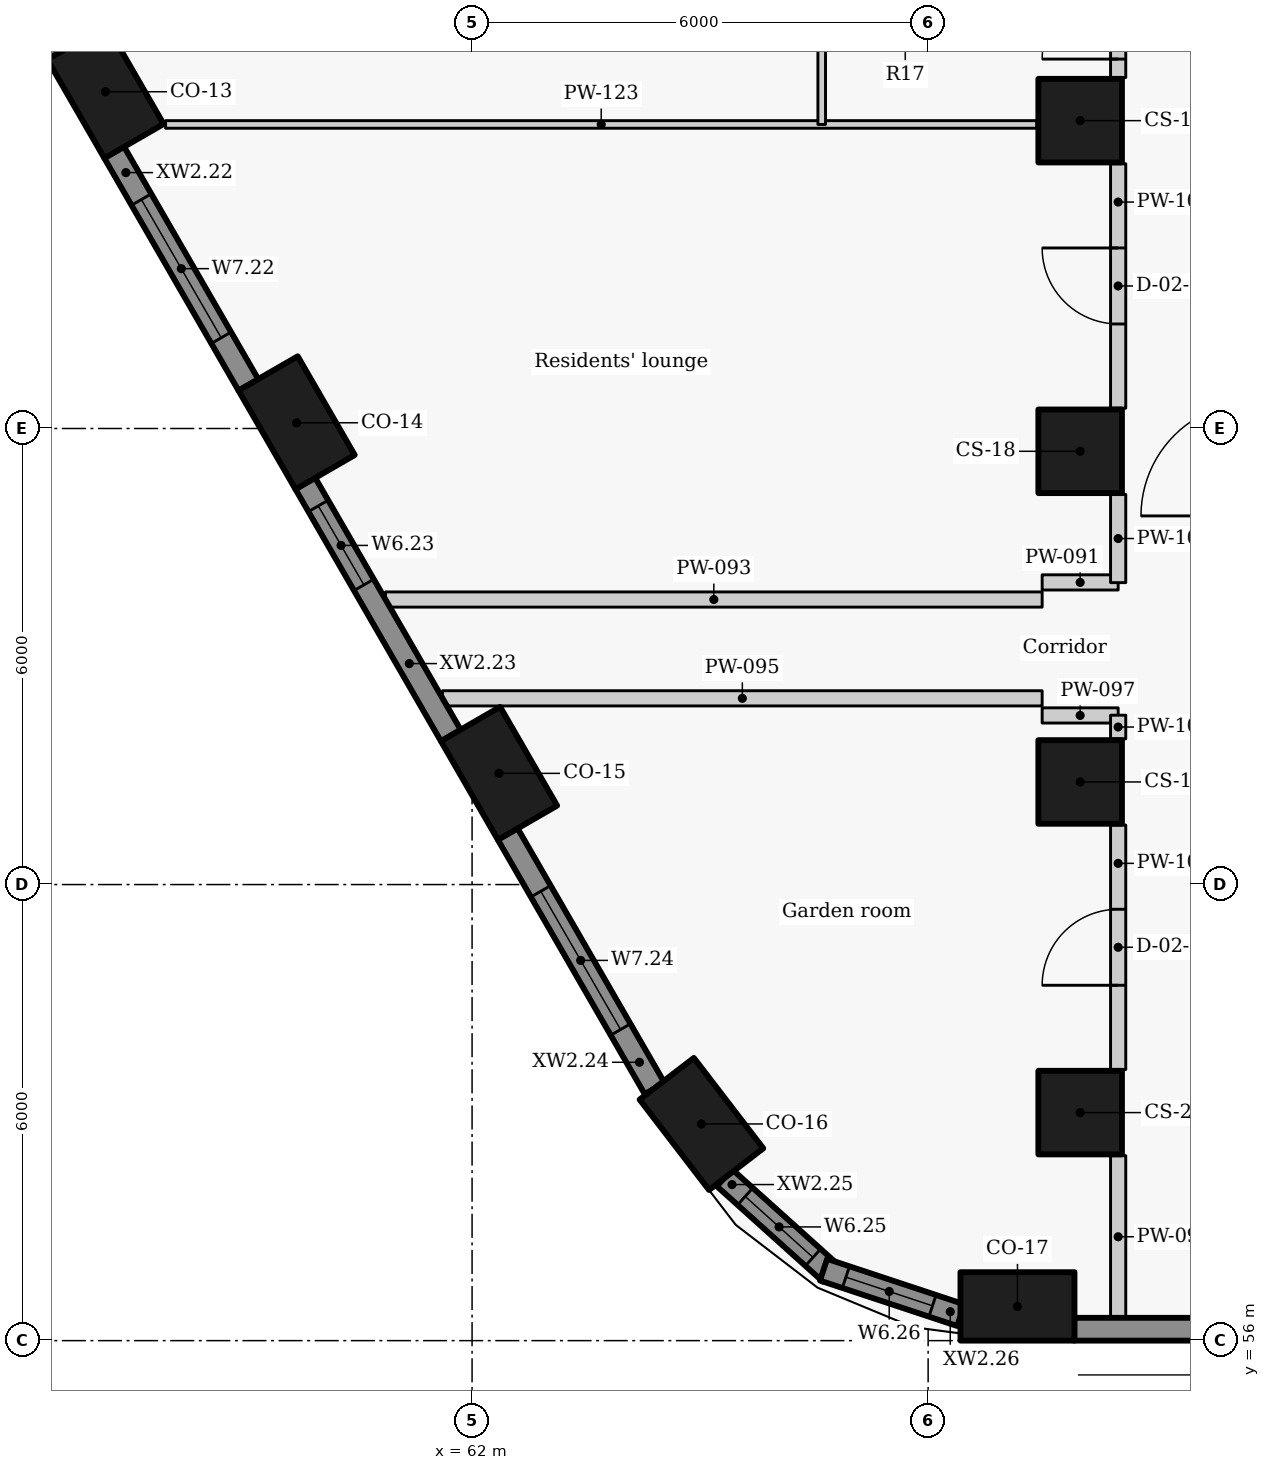
"""IFC4 building model, lengths in metres.
Left out: names, types, materials, properties, quantities, classifications, styles, units other than length and angle.
Written with IfcOpenShell. Run it as: python <this file> out.ifc"""

import sys

from ifc_helpers import new_model, si_unit, direction, frame, frame_2d, origin, origin_2d, place, context, subcontext, project, spatial, rectangle, extrude, element, fill, save


model = new_model("IFC4")
c1 = context("Model", 3, precision=1e-05, world=origin(), true_north=direction((0.0, 1.0)))
c2 = subcontext(c1, "Body", "Model", "MODEL_VIEW")
j1 = project(units=[si_unit("LENGTHUNIT", "METRE"), si_unit("PLANEANGLEUNIT", "RADIAN")], contexts=[c1])
p1 = place(None, origin())
s1 = spatial("IfcSite", under=j1, at=p1, CompositionType="ELEMENT")
p2 = place(p1, origin())
s2 = spatial("IfcBuilding", under=s1, at=p2, CompositionType="ELEMENT")
p3 = place(p2, frame((0.0, 0.0, 51.3)))
s3 = spatial("IfcBuildingStorey", under=s2, at=p3, CompositionType="ELEMENT", Elevation=51.3)
for number, where, z_axis, x_axis in (
    (1, (57.177, 72.43, 0.0), (0.0, 0.0, 1.0), (0.5, -0.866, 0.0)),
    (2, (59.692, 68.075, 0.0), (0.0, 0.0, 1.0), (0.5, -0.866, 0.0)),
    (3, (62.354, 63.463, 0.0), (0.0, 0.0, 1.0), (0.5, -0.866, 0.0)),
    (4, (65.018, 58.851, 0.0), (0.0, 0.0, 1.0), (0.609, -0.793, 0.0)),
    (5, (69.175, 56.45, 0.0), (0.0, 0.0, 1.0), (1.0, 0.0, 0.0)),
):
    element("IfcColumn", number, at=place(p3, frame(where, z_axis=z_axis, x_axis=x_axis)), inside=s3, PredefinedType="COLUMN", context=c2, shape_type="SweptSolid", body=[
        extrude(rectangle(XDim=1.5, YDim=0.9, at=origin_2d()), origin(), (0.0, 0.0, 1.0), 3.3),
    ])
for number, where, z_axis, x_axis in (
    (6, (70.0, 72.05, 0.0), (0.0, 0.0, 1.0), (0.0, -1.0, 0.0)),
    (7, (70.0, 67.7, 0.0), (0.0, 0.0, 1.0), (0.0, -1.0, 0.0)),
    (8, (70.0, 63.35, 0.0), (0.0, 0.0, 1.0), (0.0, -1.0, 0.0)),
    (9, (70.0, 59.0, 0.0), (0.0, 0.0, 1.0), (0.0, -1.0, 0.0)),
):
    element("IfcColumn", number, at=place(p3, frame(where, z_axis=z_axis, x_axis=x_axis)), inside=s3, PredefinedType="COLUMN", context=c2, shape_type="SweptSolid", body=[
        extrude(rectangle(XDim=1.1, YDim=1.1, at=origin_2d()), origin(), (0.0, 0.0, 1.0), 3.3),
    ])
p4 = place(p3, frame((53.814, 77.847, 0.0), z_axis=(0.0, 0.0, 1.0), x_axis=(0.492363204642, -0.870389840655, 0.0)))
e10 = element("IfcWall", 10, at=p4, inside=s3, PredefinedType="SOLIDWALL", context=c2, shape_type="SweptSolid", body=[
    extrude(rectangle(XDim=5.626, YDim=0.3, at=frame_2d((2.813, 0.0))), origin(), (0.0, 0.0, 1.0), 2.425),
])
p5 = place(p4, frame((0.965, 0.0, 0.9)))
e11 = element("IfcOpeningElement", 11, at=p5, cuts=e10, PredefinedType="OPENING", context=c2, shape_type="SweptSolid", body=[
    extrude(rectangle(XDim=2.1, YDim=1.1, at=frame_2d((1.05, 0.55))), frame((0.0, 0.16, 0.0), z_axis=(0.0, -1.0, 0.0), x_axis=(1.0, 0.0, 0.0)), (0.0, 0.0, 1.0), 0.32),
])
p6 = place(p4, frame((3.789, 0.0, 0.9)))
e12 = element("IfcOpeningElement", 12, at=p6, cuts=e10, PredefinedType="OPENING", context=c2, shape_type="SweptSolid", body=[
    extrude(rectangle(XDim=1.5, YDim=1.1, at=frame_2d((0.75, 0.55))), frame((0.0, 0.16, 0.0), z_axis=(0.0, -1.0, 0.0), x_axis=(1.0, 0.0, 0.0)), (0.0, 0.0, 1.0), 0.32),
])
p7 = place(p3, frame((57.29, 71.634, 0.0), z_axis=(0.0, 0.0, 1.0), x_axis=(0.499977402622, -0.866038449993, 0.0)))
e13 = element("IfcWall", 13, at=p7, inside=s3, PredefinedType="SOLIDWALL", context=c2, shape_type="SweptSolid", body=[
    extrude(rectangle(XDim=3.537, YDim=0.3, at=frame_2d((1.769, 0.0))), origin(), (0.0, 0.0, 1.0), 2.425),
])
p8 = place(p7, frame((0.719, 0.0, 0.9)))
e14 = element("IfcOpeningElement", 14, at=p8, cuts=e13, PredefinedType="OPENING", context=c2, shape_type="SweptSolid", body=[
    extrude(rectangle(XDim=2.1, YDim=1.1, at=frame_2d((1.05, 0.55))), frame((0.0, 0.16, 0.0), z_axis=(0.0, -1.0, 0.0), x_axis=(1.0, 0.0, 0.0)), (0.0, 0.0, 1.0), 0.32),
])
p9 = place(p3, frame((59.805, 67.279, 0.0), z_axis=(0.0, 0.0, 1.0), x_axis=(0.500001735503, -0.866024401789, 0.0)))
e15 = element("IfcWall", 15, at=p9, inside=s3, PredefinedType="SOLIDWALL", context=c2, shape_type="SweptSolid", body=[
    extrude(rectangle(XDim=3.834, YDim=0.3, at=frame_2d((1.917, 0.0))), origin(), (0.0, 0.0, 1.0), 2.425),
])
p10 = place(p9, frame((0.344, 0.0, 0.9)))
e16 = element("IfcOpeningElement", 16, at=p10, cuts=e15, PredefinedType="OPENING", context=c2, shape_type="SweptSolid", body=[
    extrude(rectangle(XDim=1.2, YDim=1.1, at=frame_2d((0.6, 0.55))), frame((0.0, 0.16, 0.0), z_axis=(0.0, -1.0, 0.0), x_axis=(1.0, 0.0, 0.0)), (0.0, 0.0, 1.0), 0.32),
])
p11 = place(p3, frame((62.468, 62.667, 0.0), z_axis=(0.0, 0.0, 1.0), x_axis=(0.499948341072, -0.866055227026, 0.0)))
e17 = element("IfcWall", 17, at=p11, inside=s3, PredefinedType="SOLIDWALL", context=c2, shape_type="SweptSolid", body=[
    extrude(rectangle(XDim=3.867, YDim=0.3, at=frame_2d((1.934, 0.0))), origin(), (0.0, 0.0, 1.0), 2.425),
])
p12 = place(p11, frame((0.872, 0.0, 0.9)))
e18 = element("IfcOpeningElement", 18, at=p12, cuts=e17, PredefinedType="OPENING", context=c2, shape_type="SweptSolid", body=[
    extrude(rectangle(XDim=2.1, YDim=1.1, at=frame_2d((1.05, 0.55))), frame((0.0, 0.16, 0.0), z_axis=(0.0, -1.0, 0.0), x_axis=(1.0, 0.0, 0.0)), (0.0, 0.0, 1.0), 0.32),
])
p13 = place(p3, frame((65.32, 58.143, 0.0), z_axis=(0.0, 0.0, 1.0), x_axis=(0.7435526378, -0.668677407141, 0.0)))
e19 = element("IfcWall", 19, at=p13, inside=s3, PredefinedType="SOLIDWALL", context=c2, shape_type="SweptSolid", body=[
    extrude(rectangle(XDim=1.878, YDim=0.3, at=frame_2d((0.939, 0.0))), origin(), (0.0, 0.0, 1.0), 2.425),
])
p14 = place(p13, frame((0.367, 0.0, 0.9)))
e20 = element("IfcOpeningElement", 20, at=p14, cuts=e19, PredefinedType="OPENING", context=c2, shape_type="SweptSolid", body=[
    extrude(rectangle(XDim=1.2, YDim=1.1, at=frame_2d((0.6, 0.55))), frame((0.0, 0.16, 0.0), z_axis=(0.0, -1.0, 0.0), x_axis=(1.0, 0.0, 0.0)), (0.0, 0.0, 1.0), 0.32),
])
p15 = place(p3, frame((66.624, 56.933, 0.0), z_axis=(0.0, 0.0, 1.0), x_axis=(0.949246659442, -0.314532636683, 0.0)))
e21 = element("IfcWall", 21, at=p15, inside=s3, PredefinedType="SOLIDWALL", context=c2, shape_type="SweptSolid", body=[
    extrude(rectangle(XDim=1.902, YDim=0.3, at=frame_2d((0.951, 0.0))), origin(), (0.0, 0.0, 1.0), 2.425),
])
p16 = place(p15, frame((0.31, 0.0, 0.9)))
e22 = element("IfcOpeningElement", 22, at=p16, cuts=e21, PredefinedType="OPENING", context=c2, shape_type="SweptSolid", body=[
    extrude(rectangle(XDim=1.2, YDim=1.1, at=frame_2d((0.6, 0.55))), frame((0.0, 0.16, 0.0), z_axis=(0.0, -1.0, 0.0), x_axis=(1.0, 0.0, 0.0)), (0.0, 0.0, 1.0), 0.32),
])
p17 = place(p3, frame((69.921, 56.15, 0.0), z_axis=(0.0, 0.0, 1.0), x_axis=(1.0, 0.0, 0.0)))
e23 = element("IfcWall", 23, at=p17, inside=s3, PredefinedType="SOLIDWALL", context=c2, shape_type="SweptSolid", body=[
    extrude(rectangle(XDim=19.84, YDim=0.3, at=frame_2d((9.92, 0.0))), origin(), (0.0, 0.0, 1.0), 2.425),
])
p18 = place(p3, frame((69.5, 65.975, 0.0), z_axis=(0.0, 0.0, 1.0), x_axis=(1.0, 0.0, 0.0)))
e24 = element("IfcWall", 24, at=p18, inside=s3, PredefinedType="PARTITIONING", context=c2, shape_type="SweptSolid", body=[
    extrude(rectangle(XDim=1.0, YDim=0.2, at=frame_2d((0.5, 0.0))), origin(), (0.0, 0.0, 1.0), 2.505),
])
p19 = place(p3, frame((60.861, 65.75, 0.0), z_axis=(0.0, 0.0, 1.0), x_axis=(1.0, 0.0, 0.0)))
e25 = element("IfcWall", 25, at=p19, inside=s3, PredefinedType="PARTITIONING", context=c2, shape_type="SweptSolid", body=[
    extrude(rectangle(XDim=8.639, YDim=0.2, at=frame_2d((4.32, 0.0))), origin(), (0.0, 0.0, 1.0), 2.405),
])
p20 = place(p3, frame((61.611, 64.45, 0.0), z_axis=(0.0, 0.0, 1.0), x_axis=(1.0, 0.0, 0.0)))
e26 = element("IfcWall", 26, at=p20, inside=s3, PredefinedType="PARTITIONING", context=c2, shape_type="SweptSolid", body=[
    extrude(rectangle(XDim=7.889, YDim=0.2, at=frame_2d((3.944, 0.0))), origin(), (0.0, 0.0, 1.0), 2.405),
])
p21 = place(p3, frame((69.5, 64.225, 0.0), z_axis=(0.0, 0.0, 1.0), x_axis=(1.0, 0.0, 0.0)))
e27 = element("IfcWall", 27, at=p21, inside=s3, PredefinedType="PARTITIONING", context=c2, shape_type="SweptSolid", body=[
    extrude(rectangle(XDim=1.0, YDim=0.2, at=frame_2d((0.5, 0.0))), origin(), (0.0, 0.0, 1.0), 2.505),
])
p22 = place(p3, frame((70.5, 56.3, 0.0), z_axis=(0.0, 0.0, 1.0), x_axis=(0.0, 1.0, 0.0)))
e28 = element("IfcWall", 28, at=p22, inside=s3, PredefinedType="PARTITIONING", context=c2, shape_type="SweptSolid", body=[
    extrude(rectangle(XDim=2.133, YDim=0.2, at=frame_2d((1.066, 0.0))), origin(), (0.0, 0.0, 1.0), 3.025),
])
p23 = place(p3, frame((70.5, 59.567, 0.0), z_axis=(0.0, 0.0, 1.0), x_axis=(0.0, 1.0, 0.0)))
e29 = element("IfcWall", 29, at=p23, inside=s3, PredefinedType="PARTITIONING", context=c2, shape_type="SweptSolid", body=[
    extrude(rectangle(XDim=3.216, YDim=0.2, at=frame_2d((1.608, 0.0))), origin(), (0.0, 0.0, 1.0), 3.025),
])
p24 = place(p23, frame((1.108, 0.0, 0.0)))
e30 = element("IfcOpeningElement", 30, at=p24, cuts=e29, PredefinedType="OPENING", context=c2, shape_type="SweptSolid", body=[
    extrude(rectangle(XDim=1.0, YDim=2.1, at=frame_2d((0.5, 1.05))), frame((0.0, 0.11, 0.0), z_axis=(0.0, -1.0, 0.0), x_axis=(1.0, 0.0, 0.0)), (0.0, 0.0, 1.0), 0.22),
])
p25 = place(p3, frame((70.5, 63.917, 0.0), z_axis=(0.0, 0.0, 1.0), x_axis=(0.0, 1.0, 0.0)))
e31 = element("IfcWall", 31, at=p25, inside=s3, PredefinedType="PARTITIONING", context=c2, shape_type="SweptSolid", body=[
    extrude(rectangle(XDim=0.311, YDim=0.2, at=frame_2d((0.156, 0.0))), origin(), (0.0, 0.0, 1.0), 3.025),
])
p26 = place(p3, frame((70.5, 65.972, 0.0), z_axis=(0.0, 0.0, 1.0), x_axis=(0.0, 1.0, 0.0)))
e32 = element("IfcWall", 32, at=p26, inside=s3, PredefinedType="PARTITIONING", context=c2, shape_type="SweptSolid", body=[
    extrude(rectangle(XDim=1.161, YDim=0.2, at=frame_2d((0.581, 0.0))), origin(), (0.0, 0.0, 1.0), 3.025),
])
p27 = place(p3, frame((70.5, 68.267, 0.0), z_axis=(0.0, 0.0, 1.0), x_axis=(0.0, 1.0, 0.0)))
e33 = element("IfcWall", 33, at=p27, inside=s3, PredefinedType="PARTITIONING", context=c2, shape_type="SweptSolid", body=[
    extrude(rectangle(XDim=3.216, YDim=0.2, at=frame_2d((1.608, 0.0))), origin(), (0.0, 0.0, 1.0), 3.025),
])
p28 = place(p27, frame((1.108, 0.0, 0.0)))
e34 = element("IfcOpeningElement", 34, at=p28, cuts=e33, PredefinedType="OPENING", context=c2, shape_type="SweptSolid", body=[
    extrude(rectangle(XDim=1.0, YDim=2.1, at=frame_2d((0.5, 1.05))), frame((0.0, 0.11, 0.0), z_axis=(0.0, -1.0, 0.0), x_axis=(1.0, 0.0, 0.0)), (0.0, 0.0, 1.0), 0.22),
])
p29 = place(p3, frame((70.5, 72.617, 0.0), z_axis=(0.0, 0.0, 1.0), x_axis=(0.0, 1.0, 0.0)))
e35 = element("IfcWall", 35, at=p29, inside=s3, PredefinedType="PARTITIONING", context=c2, shape_type="SweptSolid", body=[
    extrude(rectangle(XDim=4.166, YDim=0.2, at=frame_2d((2.083, 0.0))), origin(), (0.0, 0.0, 1.0), 3.025),
])
p30 = place(p29, frame((0.243, 0.0, 0.0)))
e36 = element("IfcOpeningElement", 36, at=p30, cuts=e35, PredefinedType="OPENING", context=c2, shape_type="SweptSolid", body=[
    extrude(rectangle(XDim=1.0, YDim=2.1, at=frame_2d((0.5, 1.05))), frame((0.0, 0.11, 0.0), z_axis=(0.0, -1.0, 0.0), x_axis=(1.0, 0.0, 0.0)), (0.0, 0.0, 1.0), 0.22),
])
p31 = place(p3, frame((57.968, 72.0, 0.0), z_axis=(0.0, 0.0, 1.0), x_axis=(1.0, 0.0, 0.0)))
e37 = element("IfcWall", 37, at=p31, inside=s3, PredefinedType="PARTITIONING", context=c2, shape_type="SweptSolid", body=[
    extrude(rectangle(XDim=11.462, YDim=0.1, at=frame_2d((5.731, 0.0))), origin(), (0.0, 0.0, 1.0), 3.025),
])
p32 = place(p3, frame((66.6, 72.0, 0.0), z_axis=(0.0, 0.0, 1.0), x_axis=(0.0, 1.0, 0.0)))
e38 = element("IfcWall", 38, at=p32, inside=s3, PredefinedType="PARTITIONING", context=c2, shape_type="SweptSolid", body=[
    extrude(rectangle(XDim=18.0, YDim=0.1, at=frame_2d((9.0, 0.0))), origin(), (0.0, 0.0, 1.0), 3.025),
])
p33 = place(p32, frame((1.002, 0.0, 0.0)))
e39 = element("IfcOpeningElement", 39, at=p33, cuts=e38, PredefinedType="OPENING", context=c2, shape_type="SweptSolid", body=[
    extrude(rectangle(XDim=0.9, YDim=2.1, at=frame_2d((0.45, 1.05))), frame((0.0, 0.06, 0.0), z_axis=(0.0, -1.0, 0.0), x_axis=(1.0, 0.0, 0.0)), (0.0, 0.0, 1.0), 0.12),
])
p34 = place(p32, frame((4.55, 0.0, 0.0)))
e40 = element("IfcOpeningElement", 40, at=p34, cuts=e38, PredefinedType="OPENING", context=c2, shape_type="SweptSolid", body=[
    extrude(rectangle(XDim=0.9, YDim=2.1, at=frame_2d((0.45, 1.05))), frame((0.0, 0.06, 0.0), z_axis=(0.0, -1.0, 0.0), x_axis=(1.0, 0.0, 0.0)), (0.0, 0.0, 1.0), 0.12),
])
p35 = place(p32, frame((8.098, 0.0, 0.0)))
e41 = element("IfcOpeningElement", 41, at=p35, cuts=e38, PredefinedType="OPENING", context=c2, shape_type="SweptSolid", body=[
    extrude(rectangle(XDim=0.9, YDim=2.1, at=frame_2d((0.45, 1.05))), frame((0.0, 0.06, 0.0), z_axis=(0.0, -1.0, 0.0), x_axis=(1.0, 0.0, 0.0)), (0.0, 0.0, 1.0), 0.12),
])
p36 = place(p32, frame((13.55, 0.0, 0.0)))
e42 = element("IfcOpeningElement", 42, at=p36, cuts=e38, PredefinedType="OPENING", context=c2, shape_type="SweptSolid", body=[
    extrude(rectangle(XDim=0.9, YDim=2.1, at=frame_2d((0.45, 1.05))), frame((0.0, 0.06, 0.0), z_axis=(0.0, -1.0, 0.0), x_axis=(1.0, 0.0, 0.0)), (0.0, 0.0, 1.0), 0.12),
])
p37 = place(p8, origin())
e43 = element("IfcWindow", 43, at=p37, inside=s3, PartitioningType="SINGLE_PANEL", PredefinedType="WINDOW", context=c2, shape_type="SweptSolid", body=[
    extrude(rectangle(XDim=2.1, YDim=1.1, at=frame_2d((1.05, 0.55))), frame((0.0, 0.03, 0.0), z_axis=(0.0, -1.0, 0.0), x_axis=(1.0, 0.0, 0.0)), (0.0, 0.0, 1.0), 0.06),
])
fill(e14, e43)
p38 = place(p10, origin())
e44 = element("IfcWindow", 44, at=p38, inside=s3, PartitioningType="SINGLE_PANEL", PredefinedType="WINDOW", context=c2, shape_type="SweptSolid", body=[
    extrude(rectangle(XDim=1.2, YDim=1.1, at=frame_2d((0.6, 0.55))), frame((0.0, 0.03, 0.0), z_axis=(0.0, -1.0, 0.0), x_axis=(1.0, 0.0, 0.0)), (0.0, 0.0, 1.0), 0.06),
])
fill(e16, e44)
p39 = place(p12, origin())
e45 = element("IfcWindow", 45, at=p39, inside=s3, PartitioningType="SINGLE_PANEL", PredefinedType="WINDOW", context=c2, shape_type="SweptSolid", body=[
    extrude(rectangle(XDim=2.1, YDim=1.1, at=frame_2d((1.05, 0.55))), frame((0.0, 0.03, 0.0), z_axis=(0.0, -1.0, 0.0), x_axis=(1.0, 0.0, 0.0)), (0.0, 0.0, 1.0), 0.06),
])
fill(e18, e45)
p40 = place(p14, origin())
e46 = element("IfcWindow", 46, at=p40, inside=s3, PartitioningType="SINGLE_PANEL", PredefinedType="WINDOW", context=c2, shape_type="SweptSolid", body=[
    extrude(rectangle(XDim=1.2, YDim=1.1, at=frame_2d((0.6, 0.55))), frame((0.0, 0.03, 0.0), z_axis=(0.0, -1.0, 0.0), x_axis=(1.0, 0.0, 0.0)), (0.0, 0.0, 1.0), 0.06),
])
fill(e20, e46)
p41 = place(p16, origin())
e47 = element("IfcWindow", 47, at=p41, inside=s3, PartitioningType="SINGLE_PANEL", PredefinedType="WINDOW", context=c2, shape_type="SweptSolid", body=[
    extrude(rectangle(XDim=1.2, YDim=1.1, at=frame_2d((0.6, 0.55))), frame((0.0, 0.03, 0.0), z_axis=(0.0, -1.0, 0.0), x_axis=(1.0, 0.0, 0.0)), (0.0, 0.0, 1.0), 0.06),
])
fill(e22, e47)
p42 = place(p28, origin())
e48 = element("IfcDoor", 48, at=p42, inside=s3, OperationType="SINGLE_SWING_RIGHT", PredefinedType="DOOR", context=c2, shape_type="SweptSolid", body=[
    extrude(rectangle(XDim=1.0, YDim=2.1, at=frame_2d((0.5, 1.05))), frame((0.0, 0.025, 0.0), z_axis=(0.0, -1.0, 0.0), x_axis=(1.0, 0.0, 0.0)), (0.0, 0.0, 1.0), 0.05),
])
fill(e34, e48)
p43 = place(p30, origin())
e49 = element("IfcDoor", 49, at=p43, inside=s3, OperationType="SINGLE_SWING_LEFT", PredefinedType="DOOR", context=c2, shape_type="SweptSolid", body=[
    extrude(rectangle(XDim=1.0, YDim=2.1, at=frame_2d((0.5, 1.05))), frame((0.0, 0.025, 0.0), z_axis=(0.0, -1.0, 0.0), x_axis=(1.0, 0.0, 0.0)), (0.0, 0.0, 1.0), 0.05),
])
fill(e36, e49)
p44 = place(p24, origin())
e50 = element("IfcDoor", 50, at=p44, inside=s3, OperationType="SINGLE_SWING_LEFT", PredefinedType="DOOR", context=c2, shape_type="SweptSolid", body=[
    extrude(rectangle(XDim=1.0, YDim=2.1, at=frame_2d((0.5, 1.05))), frame((0.0, 0.025, 0.0), z_axis=(0.0, -1.0, 0.0), x_axis=(1.0, 0.0, 0.0)), (0.0, 0.0, 1.0), 0.05),
])
fill(e30, e50)
save(model, sys.argv[1])
